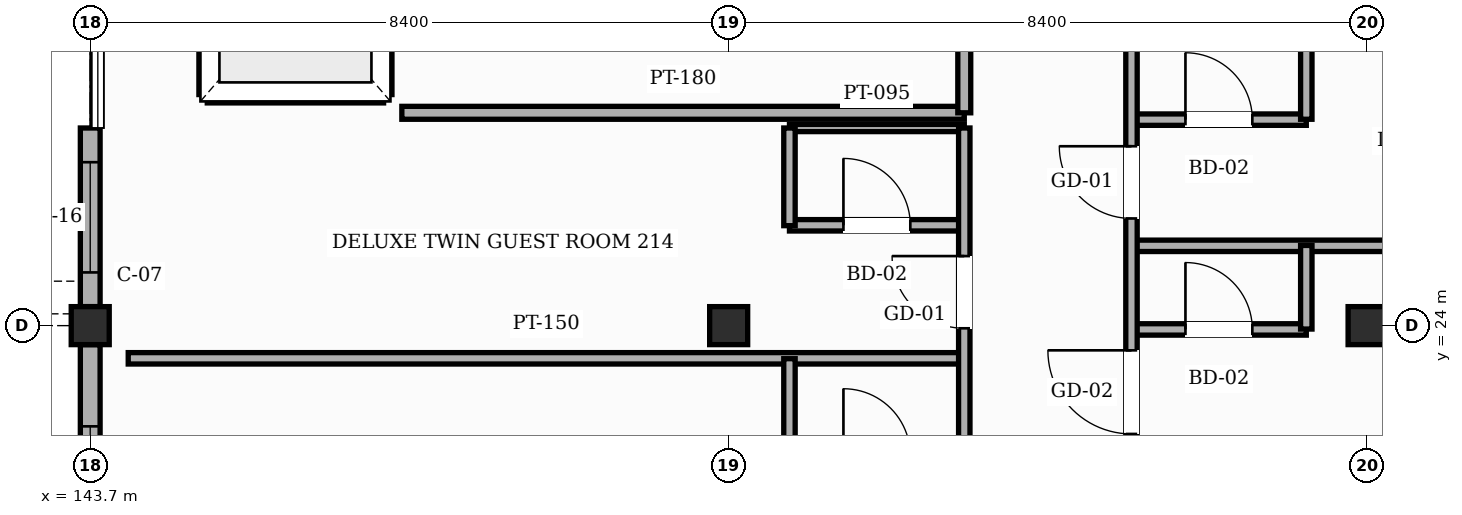
"""IFC4 building model, lengths in metres.
Left out: names, types, materials, properties, quantities, classifications, styles, units other than length and angle.
Written with IfcOpenShell. Run it as: python <this file> out.ifc"""

import sys

from ifc_helpers import new_model, si_unit, direction, frame, frame_2d, origin, origin_2d, place, context, subcontext, project, spatial, rectangle, hollow_rectangle, extrude, element, fill, save


model = new_model("IFC4")
c1 = context("Model", 3, precision=1e-05, world=origin(), true_north=direction((0.0, 1.0)))
c2 = subcontext(c1, "Body", "Model", "MODEL_VIEW")
j1 = project(units=[si_unit("LENGTHUNIT", "METRE"), si_unit("PLANEANGLEUNIT", "RADIAN")], contexts=[c1])
p1 = place(None, origin())
s1 = spatial("IfcSite", under=j1, at=p1, CompositionType="ELEMENT")
p2 = place(p1, origin())
s2 = spatial("IfcBuilding", under=s1, at=p2, CompositionType="ELEMENT")
p3 = place(p2, frame((0.0, 0.0, 35.4)))
s3 = spatial("IfcBuildingStorey", under=s2, at=p3, CompositionType="ELEMENT", Elevation=35.4)
for number, where, z_axis, x_axis in (
    (1, (143.7, 24.0, 0.0), (0.0, 0.0, 1.0), (1.0, 0.0, 0.0)),
    (2, (152.1, 24.0, 0.0), (0.0, 0.0, 1.0), (1.0, 0.0, 0.0)),
    (3, (160.5, 24.0, 0.0), (0.0, 0.0, 1.0), (1.0, 0.0, 0.0)),
):
    element("IfcColumn", number, at=place(p3, frame(where, z_axis=z_axis, x_axis=x_axis)), inside=s3, PredefinedType="COLUMN", context=c2, shape_type="SweptSolid", body=[
        extrude(hollow_rectangle(XDim=0.5, YDim=0.5, WallThickness=0.022, InnerFilletRadius=0.022, OuterFilletRadius=0.044, at=origin_2d()), origin(), (0.0, 0.0, 1.0), 3.6),
    ])
p4 = place(p3, frame((143.7, 16.25, 0.0), z_axis=(0.0, 0.0, 1.0), x_axis=(0.0, 1.0, 0.0)))
e4 = element("IfcWall", 4, at=p4, inside=s3, PredefinedType="SOLIDWALL", context=c2, shape_type="SweptSolid", body=[
    extrude(rectangle(XDim=7.5, YDim=0.26, at=frame_2d((3.75, 0.0))), origin(), (0.0, 0.0, 1.0), 2.805),
])
p5 = place(p4, frame((1.64, 0.0, 0.85)))
e5 = element("IfcOpeningElement", 5, at=p5, cuts=e4, PredefinedType="OPENING", context=c2, shape_type="SweptSolid", body=[
    extrude(rectangle(XDim=2.25, YDim=1.35, at=frame_2d((1.125, 0.675))), frame((0.0, 0.14, 0.0), z_axis=(0.0, -1.0, 0.0), x_axis=(1.0, 0.0, 0.0)), (0.0, 0.0, 1.0), 0.28),
])
p6 = place(p4, frame((5.175, 0.0, 0.85)))
e6 = element("IfcOpeningElement", 6, at=p6, cuts=e4, PredefinedType="OPENING", context=c2, shape_type="SweptSolid", body=[
    extrude(rectangle(XDim=1.25, YDim=1.35, at=frame_2d((0.625, 0.675))), frame((0.0, 0.14, 0.0), z_axis=(0.0, -1.0, 0.0), x_axis=(1.0, 0.0, 0.0)), (0.0, 0.0, 1.0), 0.28),
])
p7 = place(p3, frame((143.7, 24.25, 0.0), z_axis=(0.0, 0.0, 1.0), x_axis=(0.0, 1.0, 0.0)))
e7 = element("IfcWall", 7, at=p7, inside=s3, PredefinedType="SOLIDWALL", context=c2, shape_type="SweptSolid", body=[
    extrude(rectangle(XDim=2.35, YDim=0.26, at=frame_2d((1.175, 0.0))), origin(), (0.0, 0.0, 1.0), 2.805),
])
p8 = place(p7, frame((0.45, 0.0, 0.85)))
e8 = element("IfcOpeningElement", 8, at=p8, cuts=e7, PredefinedType="OPENING", context=c2, shape_type="SweptSolid", body=[
    extrude(rectangle(XDim=1.45, YDim=1.35, at=frame_2d((0.725, 0.675))), frame((0.0, 0.14, 0.0), z_axis=(0.0, -1.0, 0.0), x_axis=(1.0, 0.0, 0.0)), (0.0, 0.0, 1.0), 0.28),
])
p9 = place(p3, frame((145.24, 27.04, 0.0), z_axis=(0.0, 0.0, 1.0), x_axis=(1.0, 0.0, 0.0)))
e9 = element("IfcWall", 9, at=p9, inside=s3, PredefinedType="SHEAR", context=c2, shape_type="SweptSolid", body=[
    extrude(rectangle(XDim=2.32, YDim=0.22, at=frame_2d((1.16, 0.0))), origin(), (0.0, 0.0, 1.0), 3.38),
])
p10 = place(p3, frame((147.56, 27.04, 0.0), z_axis=(0.0, 0.0, 1.0), x_axis=(0.0, 1.0, 0.0)))
e10 = element("IfcWall", 10, at=p10, inside=s3, PredefinedType="SHEAR", context=c2, shape_type="SweptSolid", body=[
    extrude(rectangle(XDim=2.72, YDim=0.22, at=frame_2d((1.36, 0.0))), origin(), (0.0, 0.0, 1.0), 3.38),
])
p11 = place(p10, frame((0.635, 0.0, 0.0)))
e11 = element("IfcOpeningElement", 11, at=p11, cuts=e10, PredefinedType="OPENING", context=c2, shape_type="SweptSolid", body=[
    extrude(rectangle(XDim=1.45, YDim=2.35, at=frame_2d((0.725, 1.175))), frame((0.0, 0.12, 0.0), z_axis=(0.0, -1.0, 0.0), x_axis=(1.0, 0.0, 0.0)), (0.0, 0.0, 1.0), 0.24),
])
p12 = place(p3, frame((145.24, 27.04, 0.0), z_axis=(0.0, 0.0, 1.0), x_axis=(0.0, 1.0, 0.0)))
e12 = element("IfcWall", 12, at=p12, inside=s3, PredefinedType="SHEAR", context=c2, shape_type="SweptSolid", body=[
    extrude(rectangle(XDim=2.72, YDim=0.22, at=frame_2d((1.36, 0.0))), origin(), (0.0, 0.0, 1.0), 3.38),
])
p13 = place(p3, frame((144.2, 23.57, 0.0), z_axis=(0.0, 0.0, 1.0), x_axis=(1.0, 0.0, 0.0)))
e13 = element("IfcWall", 13, at=p13, inside=s3, PredefinedType="PARTITIONING", context=c2, shape_type="SweptSolid", body=[
    extrude(rectangle(XDim=11.0, YDim=0.15, at=frame_2d((5.5, 0.0))), origin(), (0.0, 0.0, 1.0), 3.365),
])
p14 = place(p3, frame((157.4, 23.95, 0.0), z_axis=(0.0, 0.0, 1.0), x_axis=(1.0, 0.0, 0.0)))
e14 = element("IfcWall", 14, at=p14, inside=s3, PredefinedType="PARTITIONING", context=c2, shape_type="SweptSolid", body=[
    extrude(rectangle(XDim=2.3, YDim=0.15, at=frame_2d((1.15, 0.0))), origin(), (0.0, 0.0, 1.0), 2.755),
])
p15 = place(p14, frame((0.71, 0.0, 0.0)))
e15 = element("IfcOpeningElement", 15, at=p15, cuts=e14, PredefinedType="OPENING", context=c2, shape_type="SweptSolid", body=[
    extrude(rectangle(XDim=0.88, YDim=2.12, at=frame_2d((0.44, 1.06))), frame((0.0, 0.085, 0.0), z_axis=(0.0, -1.0, 0.0), x_axis=(1.0, 0.0, 0.0)), (0.0, 0.0, 1.0), 0.17),
])
p16 = place(p3, frame((157.4, 25.05, 0.0), z_axis=(0.0, 0.0, 1.0), x_axis=(1.0, 0.0, 0.0)))
e16 = element("IfcWall", 16, at=p16, inside=s3, PredefinedType="PARTITIONING", context=c2, shape_type="SweptSolid", body=[
    extrude(rectangle(XDim=9.8, YDim=0.15, at=frame_2d((4.9, 0.0))), origin(), (0.0, 0.0, 1.0), 3.365),
])
p17 = place(p3, frame((152.9, 25.32, 0.0), z_axis=(0.0, 0.0, 1.0), x_axis=(1.0, 0.0, 0.0)))
e17 = element("IfcWall", 17, at=p17, inside=s3, PredefinedType="PARTITIONING", context=c2, shape_type="SweptSolid", body=[
    extrude(rectangle(XDim=2.3, YDim=0.15, at=frame_2d((1.15, 0.0))), origin(), (0.0, 0.0, 1.0), 3.365),
])
p18 = place(p17, frame((0.71, 0.0, 0.0)))
e18 = element("IfcOpeningElement", 18, at=p18, cuts=e17, PredefinedType="OPENING", context=c2, shape_type="SweptSolid", body=[
    extrude(rectangle(XDim=0.88, YDim=2.12, at=frame_2d((0.44, 1.06))), frame((0.0, 0.085, 0.0), z_axis=(0.0, -1.0, 0.0), x_axis=(1.0, 0.0, 0.0)), (0.0, 0.0, 1.0), 0.17),
])
p19 = place(p3, frame((152.9, 26.6, 0.0), z_axis=(0.0, 0.0, 1.0), x_axis=(1.0, 0.0, 0.0)))
e19 = element("IfcWall", 19, at=p19, inside=s3, PredefinedType="PARTITIONING", context=c2, shape_type="SweptSolid", body=[
    extrude(rectangle(XDim=2.3, YDim=0.095, at=frame_2d((1.15, 0.0))), origin(), (0.0, 0.0, 1.0), 3.365),
])
p20 = place(p3, frame((157.4, 26.71, 0.0), z_axis=(0.0, 0.0, 1.0), x_axis=(1.0, 0.0, 0.0)))
e20 = element("IfcWall", 20, at=p20, inside=s3, PredefinedType="PARTITIONING", context=c2, shape_type="SweptSolid", body=[
    extrude(rectangle(XDim=2.3, YDim=0.15, at=frame_2d((1.15, 0.0))), origin(), (0.0, 0.0, 1.0), 3.365),
])
p21 = place(p20, frame((0.71, 0.0, 0.0)))
e21 = element("IfcOpeningElement", 21, at=p21, cuts=e20, PredefinedType="OPENING", context=c2, shape_type="SweptSolid", body=[
    extrude(rectangle(XDim=0.88, YDim=2.12, at=frame_2d((0.44, 1.06))), frame((0.0, 0.085, 0.0), z_axis=(0.0, -1.0, 0.0), x_axis=(1.0, 0.0, 0.0)), (0.0, 0.0, 1.0), 0.17),
])
p22 = place(p3, frame((147.8, 26.8, 0.0), z_axis=(0.0, 0.0, 1.0), x_axis=(1.0, 0.0, 0.0)))
e22 = element("IfcWall", 22, at=p22, inside=s3, PredefinedType="PARTITIONING", context=c2, shape_type="SweptSolid", body=[
    extrude(rectangle(XDim=7.4, YDim=0.17, at=frame_2d((3.7, 0.0))), origin(), (0.0, 0.0, 1.0), 3.365),
])
p23 = place(p3, frame((152.9, 22.285, 0.0), z_axis=(0.0, 0.0, 1.0), x_axis=(0.0, 1.0, 0.0)))
e23 = element("IfcWall", 23, at=p23, inside=s3, PredefinedType="PARTITIONING", context=c2, shape_type="SweptSolid", body=[
    extrude(rectangle(XDim=1.28, YDim=0.15, at=frame_2d((0.64, 0.0))), origin(), (0.0, 0.0, 1.0), 3.365),
])
p24 = place(p3, frame((152.9, 25.315, 0.0), z_axis=(0.0, 0.0, 1.0), x_axis=(0.0, 1.0, 0.0)))
e24 = element("IfcWall", 24, at=p24, inside=s3, PredefinedType="PARTITIONING", context=c2, shape_type="SweptSolid", body=[
    extrude(rectangle(XDim=1.285, YDim=0.15, at=frame_2d((0.643, 0.0))), origin(), (0.0, 0.0, 1.0), 3.365),
])
p25 = place(p3, frame((155.2, 8.4, 0.0), z_axis=(0.0, 0.0, 1.0), x_axis=(0.0, 1.0, 0.0)))
e25 = element("IfcWall", 25, at=p25, inside=s3, PredefinedType="PARTITIONING", context=c2, shape_type="SweptSolid", body=[
    extrude(rectangle(XDim=18.2, YDim=0.15, at=frame_2d((9.1, 0.0))), origin(), (0.0, 0.0, 1.0), 3.365),
])
p26 = place(p25, frame((0.325, 0.0, 0.0)))
e26 = element("IfcOpeningElement", 26, at=p26, cuts=e25, PredefinedType="OPENING", context=c2, shape_type="SweptSolid", body=[
    extrude(rectangle(XDim=1.1, YDim=2.2, at=frame_2d((0.55, 1.1))), frame((0.0, 0.085, 0.0), z_axis=(0.0, -1.0, 0.0), x_axis=(1.0, 0.0, 0.0)), (0.0, 0.0, 1.0), 0.17),
])
p27 = place(p25, frame((3.435, 0.0, 0.0)))
e27 = element("IfcOpeningElement", 27, at=p27, cuts=e25, PredefinedType="OPENING", context=c2, shape_type="SweptSolid", body=[
    extrude(rectangle(XDim=0.95, YDim=2.15, at=frame_2d((0.475, 1.075))), frame((0.0, 0.085, 0.0), z_axis=(0.0, -1.0, 0.0), x_axis=(1.0, 0.0, 0.0)), (0.0, 0.0, 1.0), 0.17),
])
p28 = place(p25, frame((6.465, 0.0, 0.0)))
e28 = element("IfcOpeningElement", 28, at=p28, cuts=e25, PredefinedType="OPENING", context=c2, shape_type="SweptSolid", body=[
    extrude(rectangle(XDim=0.95, YDim=2.15, at=frame_2d((0.475, 1.075))), frame((0.0, 0.085, 0.0), z_axis=(0.0, -1.0, 0.0), x_axis=(1.0, 0.0, 0.0)), (0.0, 0.0, 1.0), 0.17),
])
p29 = place(p25, frame((9.5, 0.0, 0.0)))
e29 = element("IfcOpeningElement", 29, at=p29, cuts=e25, PredefinedType="OPENING", context=c2, shape_type="SweptSolid", body=[
    extrude(rectangle(XDim=0.95, YDim=2.15, at=frame_2d((0.475, 1.075))), frame((0.0, 0.085, 0.0), z_axis=(0.0, -1.0, 0.0), x_axis=(1.0, 0.0, 0.0)), (0.0, 0.0, 1.0), 0.17),
])
p30 = place(p25, frame((12.535, 0.0, 0.0)))
e30 = element("IfcOpeningElement", 30, at=p30, cuts=e25, PredefinedType="OPENING", context=c2, shape_type="SweptSolid", body=[
    extrude(rectangle(XDim=0.95, YDim=2.15, at=frame_2d((0.475, 1.075))), frame((0.0, 0.085, 0.0), z_axis=(0.0, -1.0, 0.0), x_axis=(1.0, 0.0, 0.0)), (0.0, 0.0, 1.0), 0.17),
])
p31 = place(p25, frame((15.565, 0.0, 0.0)))
e31 = element("IfcOpeningElement", 31, at=p31, cuts=e25, PredefinedType="OPENING", context=c2, shape_type="SweptSolid", body=[
    extrude(rectangle(XDim=0.95, YDim=2.15, at=frame_2d((0.475, 1.075))), frame((0.0, 0.085, 0.0), z_axis=(0.0, -1.0, 0.0), x_axis=(1.0, 0.0, 0.0)), (0.0, 0.0, 1.0), 0.17),
])
p32 = place(p3, frame((155.2, 26.8, 0.0), z_axis=(0.0, 0.0, 1.0), x_axis=(0.0, 1.0, 0.0)))
e32 = element("IfcWall", 32, at=p32, inside=s3, PredefinedType="PARTITIONING", context=c2, shape_type="SweptSolid", body=[
    extrude(rectangle(XDim=3.4, YDim=0.17, at=frame_2d((1.7, 0.0))), origin(), (0.0, 0.0, 1.0), 3.365),
])
p33 = place(p32, frame((1.1, 0.0, 0.0)))
e33 = element("IfcOpeningElement", 33, at=p33, cuts=e32, PredefinedType="OPENING", context=c2, shape_type="SweptSolid", body=[
    extrude(rectangle(XDim=1.2, YDim=2.2, at=frame_2d((0.6, 1.1))), frame((0.0, 0.095, 0.0), z_axis=(0.0, -1.0, 0.0), x_axis=(1.0, 0.0, 0.0)), (0.0, 0.0, 1.0), 0.19),
])
p34 = place(p3, frame((157.4, 22.3, 0.0), z_axis=(0.0, 0.0, 1.0), x_axis=(0.0, 1.0, 0.0)))
e34 = element("IfcWall", 34, at=p34, inside=s3, PredefinedType="PARTITIONING", context=c2, shape_type="SweptSolid", body=[
    extrude(rectangle(XDim=48.5, YDim=0.15, at=frame_2d((24.25, 0.0))), origin(), (0.0, 0.0, 1.0), 3.365),
])
p35 = place(p34, frame((24.875, 0.0, 0.0)))
e35 = element("IfcOpeningElement", 35, at=p35, cuts=e34, PredefinedType="OPENING", context=c2, shape_type="SweptSolid", body=[
    extrude(rectangle(XDim=1.65, YDim=2.35, at=frame_2d((0.825, 1.175))), frame((0.0, 0.085, 0.0), z_axis=(0.0, -1.0, 0.0), x_axis=(1.0, 0.0, 0.0)), (0.0, 0.0, 1.0), 0.17),
])
p36 = place(p34, frame((0.275, 0.0, 0.0)))
e36 = element("IfcOpeningElement", 36, at=p36, cuts=e34, PredefinedType="OPENING", context=c2, shape_type="SweptSolid", body=[
    extrude(rectangle(XDim=1.1, YDim=2.2, at=frame_2d((0.55, 1.1))), frame((0.0, 0.085, 0.0), z_axis=(0.0, -1.0, 0.0), x_axis=(1.0, 0.0, 0.0)), (0.0, 0.0, 1.0), 0.17),
])
p37 = place(p34, frame((3.11, 0.0, 0.0)))
e37 = element("IfcOpeningElement", 37, at=p37, cuts=e34, PredefinedType="OPENING", context=c2, shape_type="SweptSolid", body=[
    extrude(rectangle(XDim=0.95, YDim=2.15, at=frame_2d((0.475, 1.075))), frame((0.0, 0.085, 0.0), z_axis=(0.0, -1.0, 0.0), x_axis=(1.0, 0.0, 0.0)), (0.0, 0.0, 1.0), 0.17),
])
p38 = place(p34, frame((5.865, 0.0, 0.0)))
e38 = element("IfcOpeningElement", 38, at=p38, cuts=e34, PredefinedType="OPENING", context=c2, shape_type="SweptSolid", body=[
    extrude(rectangle(XDim=0.95, YDim=2.15, at=frame_2d((0.475, 1.075))), frame((0.0, 0.085, 0.0), z_axis=(0.0, -1.0, 0.0), x_axis=(1.0, 0.0, 0.0)), (0.0, 0.0, 1.0), 0.17),
])
p39 = place(p34, frame((8.625, 0.0, 0.0)))
e39 = element("IfcOpeningElement", 39, at=p39, cuts=e34, PredefinedType="OPENING", context=c2, shape_type="SweptSolid", body=[
    extrude(rectangle(XDim=0.95, YDim=2.15, at=frame_2d((0.475, 1.075))), frame((0.0, 0.085, 0.0), z_axis=(0.0, -1.0, 0.0), x_axis=(1.0, 0.0, 0.0)), (0.0, 0.0, 1.0), 0.17),
])
p40 = place(p34, frame((11.38, 0.0, 0.0)))
e40 = element("IfcOpeningElement", 40, at=p40, cuts=e34, PredefinedType="OPENING", context=c2, shape_type="SweptSolid", body=[
    extrude(rectangle(XDim=0.95, YDim=2.15, at=frame_2d((0.475, 1.075))), frame((0.0, 0.085, 0.0), z_axis=(0.0, -1.0, 0.0), x_axis=(1.0, 0.0, 0.0)), (0.0, 0.0, 1.0), 0.17),
])
p41 = place(p34, frame((14.14, 0.0, 0.0)))
e41 = element("IfcOpeningElement", 41, at=p41, cuts=e34, PredefinedType="OPENING", context=c2, shape_type="SweptSolid", body=[
    extrude(rectangle(XDim=0.95, YDim=2.15, at=frame_2d((0.475, 1.075))), frame((0.0, 0.085, 0.0), z_axis=(0.0, -1.0, 0.0), x_axis=(1.0, 0.0, 0.0)), (0.0, 0.0, 1.0), 0.17),
])
p42 = place(p34, frame((16.895, 0.0, 0.0)))
e42 = element("IfcOpeningElement", 42, at=p42, cuts=e34, PredefinedType="OPENING", context=c2, shape_type="SweptSolid", body=[
    extrude(rectangle(XDim=0.95, YDim=2.15, at=frame_2d((0.475, 1.075))), frame((0.0, 0.085, 0.0), z_axis=(0.0, -1.0, 0.0), x_axis=(1.0, 0.0, 0.0)), (0.0, 0.0, 1.0), 0.17),
])
p43 = place(p34, frame((32.37, 0.0, 0.0)))
e43 = element("IfcOpeningElement", 43, at=p43, cuts=e34, PredefinedType="OPENING", context=c2, shape_type="SweptSolid", body=[
    extrude(rectangle(XDim=1.1, YDim=2.2, at=frame_2d((0.55, 1.1))), frame((0.0, 0.085, 0.0), z_axis=(0.0, -1.0, 0.0), x_axis=(1.0, 0.0, 0.0)), (0.0, 0.0, 1.0), 0.17),
])
p44 = place(p34, frame((35.175, 0.0, 0.0)))
e44 = element("IfcOpeningElement", 44, at=p44, cuts=e34, PredefinedType="OPENING", context=c2, shape_type="SweptSolid", body=[
    extrude(rectangle(XDim=0.95, YDim=2.15, at=frame_2d((0.475, 1.075))), frame((0.0, 0.085, 0.0), z_axis=(0.0, -1.0, 0.0), x_axis=(1.0, 0.0, 0.0)), (0.0, 0.0, 1.0), 0.17),
])
p45 = place(p34, frame((37.91, 0.0, 0.0)))
e45 = element("IfcOpeningElement", 45, at=p45, cuts=e34, PredefinedType="OPENING", context=c2, shape_type="SweptSolid", body=[
    extrude(rectangle(XDim=0.95, YDim=2.15, at=frame_2d((0.475, 1.075))), frame((0.0, 0.085, 0.0), z_axis=(0.0, -1.0, 0.0), x_axis=(1.0, 0.0, 0.0)), (0.0, 0.0, 1.0), 0.17),
])
p46 = place(p34, frame((40.64, 0.0, 0.0)))
e46 = element("IfcOpeningElement", 46, at=p46, cuts=e34, PredefinedType="OPENING", context=c2, shape_type="SweptSolid", body=[
    extrude(rectangle(XDim=0.95, YDim=2.15, at=frame_2d((0.475, 1.075))), frame((0.0, 0.085, 0.0), z_axis=(0.0, -1.0, 0.0), x_axis=(1.0, 0.0, 0.0)), (0.0, 0.0, 1.0), 0.17),
])
p47 = place(p34, frame((43.375, 0.0, 0.0)))
e47 = element("IfcOpeningElement", 47, at=p47, cuts=e34, PredefinedType="OPENING", context=c2, shape_type="SweptSolid", body=[
    extrude(rectangle(XDim=0.95, YDim=2.15, at=frame_2d((0.475, 1.075))), frame((0.0, 0.085, 0.0), z_axis=(0.0, -1.0, 0.0), x_axis=(1.0, 0.0, 0.0)), (0.0, 0.0, 1.0), 0.17),
])
p48 = place(p34, frame((46.11, 0.0, 0.0)))
e48 = element("IfcOpeningElement", 48, at=p48, cuts=e34, PredefinedType="OPENING", context=c2, shape_type="SweptSolid", body=[
    extrude(rectangle(XDim=0.95, YDim=2.15, at=frame_2d((0.475, 1.075))), frame((0.0, 0.085, 0.0), z_axis=(0.0, -1.0, 0.0), x_axis=(1.0, 0.0, 0.0)), (0.0, 0.0, 1.0), 0.17),
])
for number, where, z_axis, x_axis in (
    (49, (159.7, 23.955, 0.0), (0.0, 0.0, 1.0), (0.0, 1.0, 0.0)),
    (50, (159.7, 26.715, 0.0), (0.0, 0.0, 1.0), (0.0, 1.0, 0.0)),
):
    element("IfcWall", number, at=place(p3, frame(where, z_axis=z_axis, x_axis=x_axis)), inside=s3, PredefinedType="PARTITIONING", context=c2, shape_type="SweptSolid", body=[
        extrude(rectangle(XDim=1.1, YDim=0.15, at=frame_2d((0.55, 0.0))), origin(), (0.0, 0.0, 1.0), 3.365),
    ])
p49 = place(p6, origin())
e51 = element("IfcWindow", 51, at=p49, inside=s3, PartitioningType="SINGLE_PANEL", PredefinedType="WINDOW", context=c2, shape_type="SweptSolid", body=[
    extrude(rectangle(XDim=1.25, YDim=1.35, at=frame_2d((0.625, 0.675))), frame((0.0, 0.03, 0.0), z_axis=(0.0, -1.0, 0.0), x_axis=(1.0, 0.0, 0.0)), (0.0, 0.0, 1.0), 0.06),
])
fill(e6, e51)
p50 = place(p8, origin())
e52 = element("IfcWindow", 52, at=p50, inside=s3, PartitioningType="SINGLE_PANEL", PredefinedType="WINDOW", context=c2, shape_type="SweptSolid", body=[
    extrude(rectangle(XDim=1.45, YDim=1.35, at=frame_2d((0.725, 0.675))), frame((0.0, 0.03, 0.0), z_axis=(0.0, -1.0, 0.0), x_axis=(1.0, 0.0, 0.0)), (0.0, 0.0, 1.0), 0.06),
])
fill(e8, e52)
p51 = place(p31, origin())
e53 = element("IfcDoor", 53, at=p51, inside=s3, OperationType="SINGLE_SWING_RIGHT", PredefinedType="DOOR", context=c2, shape_type="SweptSolid", body=[
    extrude(rectangle(XDim=0.95, YDim=2.15, at=frame_2d((0.475, 1.075))), frame((0.0, 0.025, 0.0), z_axis=(0.0, -1.0, 0.0), x_axis=(1.0, 0.0, 0.0)), (0.0, 0.0, 1.0), 0.05),
])
fill(e31, e53)
p52 = place(p18, origin())
e54 = element("IfcDoor", 54, at=p52, inside=s3, OperationType="SINGLE_SWING_LEFT", PredefinedType="DOOR", context=c2, shape_type="SweptSolid", body=[
    extrude(rectangle(XDim=0.88, YDim=2.12, at=frame_2d((0.44, 1.06))), frame((0.0, 0.025, 0.0), z_axis=(0.0, -1.0, 0.0), x_axis=(1.0, 0.0, 0.0)), (0.0, 0.0, 1.0), 0.05),
])
fill(e18, e54)
p53 = place(p36, origin())
e55 = element("IfcDoor", 55, at=p53, inside=s3, OperationType="SINGLE_SWING_RIGHT", PredefinedType="DOOR", context=c2, shape_type="SweptSolid", body=[
    extrude(rectangle(XDim=1.1, YDim=2.2, at=frame_2d((0.55, 1.1))), frame((0.0, 0.025, 0.0), z_axis=(0.0, -1.0, 0.0), x_axis=(1.0, 0.0, 0.0)), (0.0, 0.0, 1.0), 0.05),
])
fill(e36, e55)
p54 = place(p15, origin())
e56 = element("IfcDoor", 56, at=p54, inside=s3, OperationType="SINGLE_SWING_LEFT", PredefinedType="DOOR", context=c2, shape_type="SweptSolid", body=[
    extrude(rectangle(XDim=0.88, YDim=2.12, at=frame_2d((0.44, 1.06))), frame((0.0, 0.025, 0.0), z_axis=(0.0, -1.0, 0.0), x_axis=(1.0, 0.0, 0.0)), (0.0, 0.0, 1.0), 0.05),
])
fill(e15, e56)
p55 = place(p37, origin())
e57 = element("IfcDoor", 57, at=p55, inside=s3, OperationType="SINGLE_SWING_RIGHT", PredefinedType="DOOR", context=c2, shape_type="SweptSolid", body=[
    extrude(rectangle(XDim=0.95, YDim=2.15, at=frame_2d((0.475, 1.075))), frame((0.0, 0.025, 0.0), z_axis=(0.0, -1.0, 0.0), x_axis=(1.0, 0.0, 0.0)), (0.0, 0.0, 1.0), 0.05),
])
fill(e37, e57)
p56 = place(p21, origin())
e58 = element("IfcDoor", 58, at=p56, inside=s3, OperationType="SINGLE_SWING_LEFT", PredefinedType="DOOR", context=c2, shape_type="SweptSolid", body=[
    extrude(rectangle(XDim=0.88, YDim=2.12, at=frame_2d((0.44, 1.06))), frame((0.0, 0.025, 0.0), z_axis=(0.0, -1.0, 0.0), x_axis=(1.0, 0.0, 0.0)), (0.0, 0.0, 1.0), 0.05),
])
fill(e21, e58)
save(model, sys.argv[1])
